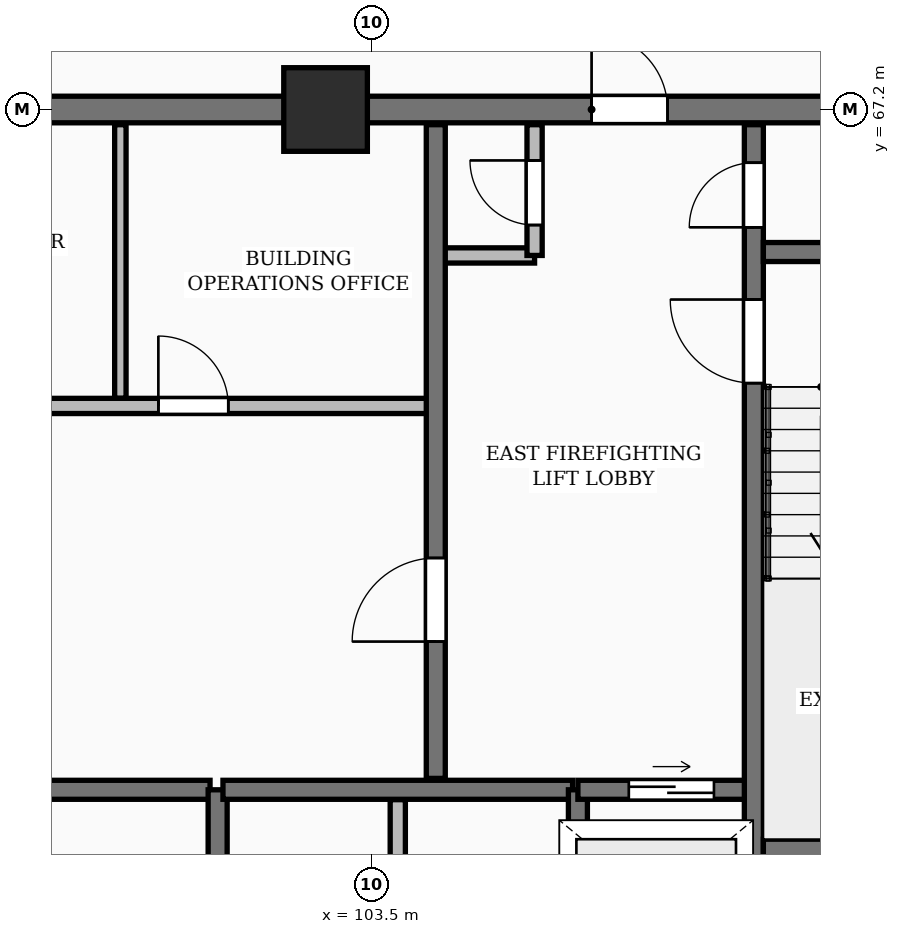
"""IFC4 building model, lengths in metres.
Left out: names, types, materials, properties, quantities, classifications, styles, units other than length and angle.
Written with IfcOpenShell. Run it as: python <this file> out.ifc"""

import sys

from ifc_helpers import new_model, si_unit, direction, frame, frame_2d, origin, origin_2d, place, context, subcontext, project, spatial, rectangle, extrude, element, fill, save


model = new_model("IFC4")
c1 = context("Model", 3, precision=1e-05, world=origin(), true_north=direction((0.0, 1.0)))
c2 = subcontext(c1, "Body", "Model", "MODEL_VIEW")
j1 = project(units=[si_unit("LENGTHUNIT", "METRE"), si_unit("PLANEANGLEUNIT", "RADIAN")], contexts=[c1])
p1 = place(None, origin())
s1 = spatial("IfcSite", under=j1, at=p1, CompositionType="ELEMENT")
p2 = place(p1, origin())
s2 = spatial("IfcBuilding", under=s1, at=p2, CompositionType="ELEMENT")
p3 = place(p2, frame((0.0, 0.0, -10.8)))
s3 = spatial("IfcBuildingStorey", under=s2, at=p3, CompositionType="ELEMENT", Elevation=-10.8)
p4 = place(p3, frame((102.9, 67.2, -0.45), z_axis=(0.0, 0.0, 1.0), x_axis=(1.0, 0.0, 0.0)))
e1 = element("IfcColumn", 1, at=p4, inside=s3, PredefinedType="COLUMN", context=c2, shape_type="SweptSolid", body=[
    extrude(rectangle(XDim=1.1, YDim=1.1, at=origin_2d()), origin(), (0.0, 0.0, 1.0), 4.05),
])
p5 = place(p3, frame((75.95, 67.2, 0.0), z_axis=(0.0, 0.0, 1.0), x_axis=(1.0, 0.0, 0.0)))
e2 = element("IfcWall", 2, at=p5, inside=s3, PredefinedType="SHEAR", context=c2, shape_type="SweptSolid", body=[
    extrude(rectangle(XDim=36.3, YDim=0.35, at=frame_2d((18.15, 0.0))), origin(), (0.0, 0.0, 1.0), 3.6),
])
p6 = place(p5, frame((5.25, 0.0, 0.0)))
e3 = element("IfcOpeningElement", 3, at=p6, cuts=e2, PredefinedType="OPENING", context=c2, shape_type="SweptSolid", body=[
    extrude(rectangle(XDim=1.0, YDim=2.15, at=frame_2d((0.5, 1.075))), frame((0.0, 0.185, 0.0), z_axis=(0.0, -1.0, 0.0), x_axis=(1.0, 0.0, 0.0)), (0.0, 0.0, 1.0), 0.37),
])
p7 = place(p5, frame((21.6, 0.0, 0.0)))
e4 = element("IfcOpeningElement", 4, at=p7, cuts=e2, PredefinedType="OPENING", context=c2, shape_type="SweptSolid", body=[
    extrude(rectangle(XDim=1.5, YDim=2.2, at=frame_2d((0.75, 1.1))), frame((0.0, 0.185, 0.0), z_axis=(0.0, -1.0, 0.0), x_axis=(1.0, 0.0, 0.0)), (0.0, 0.0, 1.0), 0.37),
])
p8 = place(p5, frame((30.45, 0.0, 0.0)))
e5 = element("IfcOpeningElement", 5, at=p8, cuts=e2, PredefinedType="OPENING", context=c2, shape_type="SweptSolid", body=[
    extrude(rectangle(XDim=1.0, YDim=2.15, at=frame_2d((0.5, 1.075))), frame((0.0, 0.185, 0.0), z_axis=(0.0, -1.0, 0.0), x_axis=(1.0, 0.0, 0.0)), (0.0, 0.0, 1.0), 0.37),
])
p9 = place(p3, frame((93.02, 58.25, 0.0), z_axis=(0.0, 0.0, 1.0), x_axis=(1.0, 0.0, 0.0)))
e6 = element("IfcWall", 6, at=p9, inside=s3, PredefinedType="SHEAR", context=c2, shape_type="SweptSolid", body=[
    extrude(rectangle(XDim=8.36, YDim=0.25, at=frame_2d((4.18, 0.0))), origin(), (0.0, 0.0, 1.0), 3.6),
])
p10 = place(p3, frame((101.48, 55.4, 0.0), z_axis=(0.0, 0.0, 1.0), x_axis=(0.0, 1.0, 0.0)))
e7 = element("IfcWall", 7, at=p10, inside=s3, PredefinedType="SHEAR", context=c2, shape_type="SweptSolid", body=[
    extrude(rectangle(XDim=2.85, YDim=0.25, at=frame_2d((1.425, 0.0))), origin(), (0.0, 0.0, 1.0), 3.6),
])
p11 = place(p3, frame((103.85, 55.4, 0.0), z_axis=(0.0, 0.0, 1.0), x_axis=(0.0, 1.0, 0.0)))
e8 = element("IfcWall", 8, at=p11, inside=s3, PredefinedType="PARTITIONING", context=c2, shape_type="SweptSolid", body=[
    extrude(rectangle(XDim=2.72, YDim=0.2, at=frame_2d((1.36, 0.0))), origin(), (0.0, 0.0, 1.0), 3.3),
])
p12 = place(p3, frame((101.55, 58.25, 0.0), z_axis=(0.0, 0.0, 1.0), x_axis=(1.0, 0.0, 0.0)))
e9 = element("IfcWall", 9, at=p12, inside=s3, PredefinedType="SHEAR", context=c2, shape_type="SweptSolid", body=[
    extrude(rectangle(XDim=4.6, YDim=0.25, at=frame_2d((2.3, 0.0))), origin(), (0.0, 0.0, 1.0), 3.6),
])
p13 = place(p3, frame((106.22, 55.4, 0.0), z_axis=(0.0, 0.0, 1.0), x_axis=(0.0, 1.0, 0.0)))
e10 = element("IfcWall", 10, at=p13, inside=s3, PredefinedType="SHEAR", context=c2, shape_type="SweptSolid", body=[
    extrude(rectangle(XDim=2.85, YDim=0.25, at=frame_2d((1.425, 0.0))), origin(), (0.0, 0.0, 1.0), 3.6),
])
p14 = place(p3, frame((106.22, 58.25, 0.0), z_axis=(0.0, 0.0, 1.0), x_axis=(1.0, 0.0, 0.0)))
e11 = element("IfcWall", 11, at=p14, inside=s3, PredefinedType="SHEAR", context=c2, shape_type="SweptSolid", body=[
    extrude(rectangle(XDim=2.46, YDim=0.25, at=frame_2d((1.23, 0.0))), origin(), (0.0, 0.0, 1.0), 3.6),
])
p15 = place(p14, frame((0.67, 0.0, 0.0)))
e12 = element("IfcOpeningElement", 12, at=p15, cuts=e11, PredefinedType="OPENING", context=c2, shape_type="SweptSolid", body=[
    extrude(rectangle(XDim=1.12, YDim=2.12, at=frame_2d((0.56, 1.06))), frame((0.0, 0.135, 0.0), z_axis=(0.0, -1.0, 0.0), x_axis=(1.0, 0.0, 0.0)), (0.0, 0.0, 1.0), 0.27),
])
p16 = place(p3, frame((100.2, 63.4, 0.0), z_axis=(0.0, 0.0, 1.0), x_axis=(0.0, 1.0, 0.0)))
e13 = element("IfcWall", 13, at=p16, inside=s3, PredefinedType="PARTITIONING", context=c2, shape_type="SweptSolid", body=[
    extrude(rectangle(XDim=3.6, YDim=0.15, at=frame_2d((1.8, 0.0))), origin(), (0.0, 0.0, 1.0), 3.3),
])
p17 = place(p3, frame((84.42, 63.3, 0.0), z_axis=(0.0, 0.0, 1.0), x_axis=(1.0, 0.0, 0.0)))
e14 = element("IfcWall", 14, at=p17, inside=s3, PredefinedType="PARTITIONING", context=c2, shape_type="SweptSolid", body=[
    extrude(rectangle(XDim=19.83, YDim=0.2, at=frame_2d((9.915, 0.0))), origin(), (0.0, 0.0, 1.0), 3.3),
])
p18 = place(p17, frame((1.15, 0.0, 0.0)))
e15 = element("IfcOpeningElement", 15, at=p18, cuts=e14, PredefinedType="OPENING", context=c2, shape_type="SweptSolid", body=[
    extrude(rectangle(XDim=0.85, YDim=2.05, at=frame_2d((0.425, 1.025))), frame((0.0, 0.11, 0.0), z_axis=(0.0, -1.0, 0.0), x_axis=(1.0, 0.0, 0.0)), (0.0, 0.0, 1.0), 0.22),
])
p19 = place(p17, frame((3.25, 0.0, 0.0)))
e16 = element("IfcOpeningElement", 16, at=p19, cuts=e14, PredefinedType="OPENING", context=c2, shape_type="SweptSolid", body=[
    extrude(rectangle(XDim=0.85, YDim=2.05, at=frame_2d((0.425, 1.025))), frame((0.0, 0.11, 0.0), z_axis=(0.0, -1.0, 0.0), x_axis=(1.0, 0.0, 0.0)), (0.0, 0.0, 1.0), 0.22),
])
p20 = place(p17, frame((13.08, 0.0, 0.0)))
e17 = element("IfcOpeningElement", 17, at=p20, cuts=e14, PredefinedType="OPENING", context=c2, shape_type="SweptSolid", body=[
    extrude(rectangle(XDim=1.5, YDim=2.2, at=frame_2d((0.75, 1.1))), frame((0.0, 0.11, 0.0), z_axis=(0.0, -1.0, 0.0), x_axis=(1.0, 0.0, 0.0)), (0.0, 0.0, 1.0), 0.22),
])
p21 = place(p17, frame((6.78, 0.0, 0.0)))
e18 = element("IfcOpeningElement", 18, at=p21, cuts=e14, PredefinedType="OPENING", context=c2, shape_type="SweptSolid", body=[
    extrude(rectangle(XDim=0.92, YDim=2.08, at=frame_2d((0.46, 1.04))), frame((0.0, 0.11, 0.0), z_axis=(0.0, -1.0, 0.0), x_axis=(1.0, 0.0, 0.0)), (0.0, 0.0, 1.0), 0.22),
])
p22 = place(p17, frame((16.28, 0.0, 0.0)))
e19 = element("IfcOpeningElement", 19, at=p22, cuts=e14, PredefinedType="OPENING", context=c2, shape_type="SweptSolid", body=[
    extrude(rectangle(XDim=0.92, YDim=2.08, at=frame_2d((0.46, 1.04))), frame((0.0, 0.11, 0.0), z_axis=(0.0, -1.0, 0.0), x_axis=(1.0, 0.0, 0.0)), (0.0, 0.0, 1.0), 0.22),
])
p23 = place(p3, frame((104.45, 65.28, 0.0), z_axis=(0.0, 0.0, 1.0), x_axis=(1.0, 0.0, 0.0)))
e20 = element("IfcWall", 20, at=p23, inside=s3, PredefinedType="PARTITIONING", context=c2, shape_type="SweptSolid", body=[
    extrude(rectangle(XDim=1.2, YDim=0.2, at=frame_2d((0.6, 0.0))), origin(), (0.0, 0.0, 1.0), 3.3),
])
p24 = place(p3, frame((105.65, 65.28, 0.0), z_axis=(0.0, 0.0, 1.0), x_axis=(0.0, 1.0, 0.0)))
e21 = element("IfcWall", 21, at=p24, inside=s3, PredefinedType="PARTITIONING", context=c2, shape_type="SweptSolid", body=[
    extrude(rectangle(XDim=1.72, YDim=0.2, at=frame_2d((0.86, 0.0))), origin(), (0.0, 0.0, 1.0), 3.3),
])
p25 = place(p24, frame((0.4, 0.0, 0.0)))
e22 = element("IfcOpeningElement", 22, at=p25, cuts=e21, PredefinedType="OPENING", context=c2, shape_type="SweptSolid", body=[
    extrude(rectangle(XDim=0.85, YDim=2.05, at=frame_2d((0.425, 1.025))), frame((0.0, 0.11, 0.0), z_axis=(0.0, -1.0, 0.0), x_axis=(1.0, 0.0, 0.0)), (0.0, 0.0, 1.0), 0.22),
])
p26 = place(p3, frame((104.35, 58.4, 0.0), z_axis=(0.0, 0.0, 1.0), x_axis=(0.0, 1.0, 0.0)))
e23 = element("IfcWall", 23, at=p26, inside=s3, PredefinedType="SHEAR", context=c2, shape_type="SweptSolid", body=[
    extrude(rectangle(XDim=8.6, YDim=0.25, at=frame_2d((4.3, 0.0))), origin(), (0.0, 0.0, 1.0), 3.6),
])
p27 = place(p26, frame((1.8, 0.0, 0.0)))
e24 = element("IfcOpeningElement", 24, at=p27, cuts=e23, PredefinedType="OPENING", context=c2, shape_type="SweptSolid", body=[
    extrude(rectangle(XDim=1.1, YDim=2.1, at=frame_2d((0.55, 1.05))), frame((0.0, 0.135, 0.0), z_axis=(0.0, -1.0, 0.0), x_axis=(1.0, 0.0, 0.0)), (0.0, 0.0, 1.0), 0.27),
])
p28 = place(p3, frame((108.535, 55.4, 0.0), z_axis=(0.0, 0.0, 1.0), x_axis=(0.0, 1.0, 0.0)))
e25 = element("IfcWall", 25, at=p28, inside=s3, PredefinedType="SHEAR", context=c2, shape_type="SweptSolid", body=[
    extrude(rectangle(XDim=11.6, YDim=0.25, at=frame_2d((5.8, 0.0))), origin(), (0.0, 0.0, 1.0), 3.6),
])
p29 = place(p28, frame((8.2, 0.0, 0.0)))
e26 = element("IfcOpeningElement", 26, at=p29, cuts=e25, PredefinedType="OPENING", context=c2, shape_type="SweptSolid", body=[
    extrude(rectangle(XDim=1.1, YDim=2.1, at=frame_2d((0.55, 1.05))), frame((0.0, 0.135, 0.0), z_axis=(0.0, -1.0, 0.0), x_axis=(1.0, 0.0, 0.0)), (0.0, 0.0, 1.0), 0.27),
])
p30 = place(p28, frame((10.25, 0.0, 0.0)))
e27 = element("IfcOpeningElement", 27, at=p30, cuts=e25, PredefinedType="OPENING", context=c2, shape_type="SweptSolid", body=[
    extrude(rectangle(XDim=0.85, YDim=2.05, at=frame_2d((0.425, 1.025))), frame((0.0, 0.135, 0.0), z_axis=(0.0, -1.0, 0.0), x_axis=(1.0, 0.0, 0.0)), (0.0, 0.0, 1.0), 0.27),
])
for number, where, z_axis, x_axis in (
    (28, (108.66, 57.475, 0.0), (0.0, 0.0, 1.0), (1.0, 0.0, 0.0)),
    (29, (108.66, 65.325, 0.0), (0.0, 0.0, 1.0), (1.0, 0.0, 0.0)),
):
    element("IfcWall", number, at=place(p3, frame(where, z_axis=z_axis, x_axis=x_axis)), inside=s3, PredefinedType="SHEAR", context=c2, shape_type="SweptSolid", body=[
        extrude(rectangle(XDim=3.24, YDim=0.25, at=frame_2d((1.62, 0.0))), origin(), (0.0, 0.0, 1.0), 3.6),
    ])
p31 = place(p8, origin())
e30 = element("IfcDoor", 30, at=p31, inside=s3, OperationType="SINGLE_SWING_LEFT", PredefinedType="DOOR", context=c2, shape_type="SweptSolid", body=[
    extrude(rectangle(XDim=1.0, YDim=2.15, at=frame_2d((0.5, 1.075))), frame((0.0, 0.025, 0.0), z_axis=(0.0, -1.0, 0.0), x_axis=(1.0, 0.0, 0.0)), (0.0, 0.0, 1.0), 0.05),
])
fill(e5, e30)
p32 = place(p15, origin())
e31 = element("IfcDoor", 31, at=p32, inside=s3, OperationType="SLIDING_TO_RIGHT", PredefinedType="DOOR", context=c2, shape_type="SweptSolid", body=[
    extrude(rectangle(XDim=1.12, YDim=2.12, at=frame_2d((0.56, 1.06))), frame((0.0, 0.025, 0.0), z_axis=(0.0, -1.0, 0.0), x_axis=(1.0, 0.0, 0.0)), (0.0, 0.0, 1.0), 0.05),
])
fill(e12, e31)
p33 = place(p22, origin())
e32 = element("IfcDoor", 32, at=p33, inside=s3, OperationType="SINGLE_SWING_LEFT", PredefinedType="DOOR", context=c2, shape_type="SweptSolid", body=[
    extrude(rectangle(XDim=0.92, YDim=2.08, at=frame_2d((0.46, 1.04))), frame((0.0, 0.025, 0.0), z_axis=(0.0, -1.0, 0.0), x_axis=(1.0, 0.0, 0.0)), (0.0, 0.0, 1.0), 0.05),
])
fill(e19, e32)
p34 = place(p25, origin())
e33 = element("IfcDoor", 33, at=p34, inside=s3, OperationType="SINGLE_SWING_RIGHT", PredefinedType="DOOR", context=c2, shape_type="SweptSolid", body=[
    extrude(rectangle(XDim=0.85, YDim=2.05, at=frame_2d((0.425, 1.025))), frame((0.0, 0.025, 0.0), z_axis=(0.0, -1.0, 0.0), x_axis=(1.0, 0.0, 0.0)), (0.0, 0.0, 1.0), 0.05),
])
fill(e22, e33)
p35 = place(p27, origin())
e34 = element("IfcDoor", 34, at=p35, inside=s3, OperationType="SINGLE_SWING_LEFT", PredefinedType="DOOR", context=c2, shape_type="SweptSolid", body=[
    extrude(rectangle(XDim=1.1, YDim=2.1, at=frame_2d((0.55, 1.05))), frame((0.0, 0.025, 0.0), z_axis=(0.0, -1.0, 0.0), x_axis=(1.0, 0.0, 0.0)), (0.0, 0.0, 1.0), 0.05),
])
fill(e24, e34)
p36 = place(p29, origin())
e35 = element("IfcDoor", 35, at=p36, inside=s3, OperationType="SINGLE_SWING_RIGHT", PredefinedType="DOOR", context=c2, shape_type="SweptSolid", body=[
    extrude(rectangle(XDim=1.1, YDim=2.1, at=frame_2d((0.55, 1.05))), frame((0.0, 0.025, 0.0), z_axis=(0.0, -1.0, 0.0), x_axis=(1.0, 0.0, 0.0)), (0.0, 0.0, 1.0), 0.05),
])
fill(e26, e35)
p37 = place(p30, origin())
e36 = element("IfcDoor", 36, at=p37, inside=s3, OperationType="SINGLE_SWING_LEFT", PredefinedType="DOOR", context=c2, shape_type="SweptSolid", body=[
    extrude(rectangle(XDim=0.85, YDim=2.05, at=frame_2d((0.425, 1.025))), frame((0.0, 0.025, 0.0), z_axis=(0.0, -1.0, 0.0), x_axis=(1.0, 0.0, 0.0)), (0.0, 0.0, 1.0), 0.05),
])
fill(e27, e36)
save(model, sys.argv[1])
